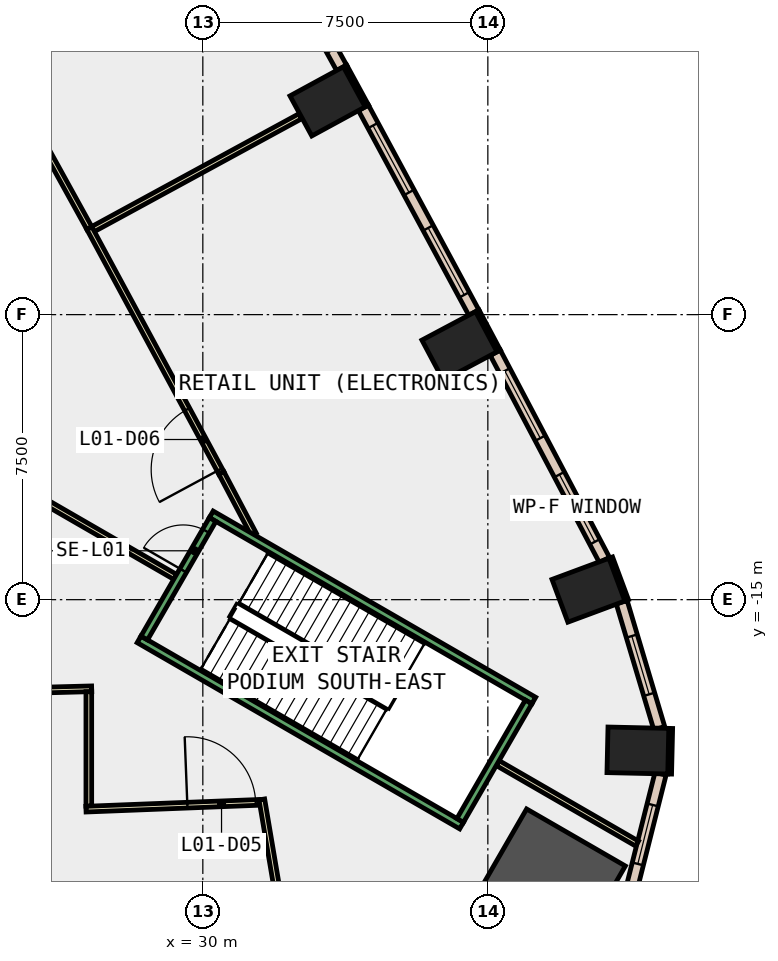
"""IFC4 building model, lengths in metres.
Left out: names, types, materials, properties, quantities, classifications, styles, units other than length and angle.
Written with IfcOpenShell. Run it as: python <this file> out.ifc"""

import sys

from ifc_helpers import new_model, si_unit, direction, frame, frame_2d, origin, origin_2d, place, context, subcontext, project, spatial, rectangle, extrude, element, fill, save


model = new_model("IFC4")
c1 = context("Model", 3, precision=1e-05, world=origin(), true_north=direction((0.0, 1.0)))
c2 = subcontext(c1, "Body", "Model", "MODEL_VIEW")
j1 = project(units=[si_unit("LENGTHUNIT", "METRE"), si_unit("PLANEANGLEUNIT", "RADIAN")], contexts=[c1])
p1 = place(None, origin())
s1 = spatial("IfcSite", under=j1, at=p1, CompositionType="ELEMENT")
p2 = place(p1, origin())
s2 = spatial("IfcBuilding", under=s1, at=p2, CompositionType="ELEMENT")
p3 = place(p2, frame((0.0, 0.0, 9.0)))
s3 = spatial("IfcBuildingStorey", under=s2, at=p3, CompositionType="ELEMENT", Elevation=9.0)
p4 = place(p3, frame((39.069, -22.556, -0.45), z_axis=(0.0, 0.0, 1.0), x_axis=(-0.866025403784, 0.5, 0.0)))
e1 = element("IfcColumn", 1, at=p4, inside=s3, PredefinedType="COLUMN", context=c2, shape_type="SweptSolid", body=[
    extrude(rectangle(XDim=3.0, YDim=3.0, at=origin_2d()), origin(), (0.0, 0.0, 1.0), 6.0),
])
for number, where, z_axis, x_axis in (
    (2, (41.448, -18.969, -0.45), (0.0, 0.0, 1.0), (0.023, 1.0, 0.0)),
    (3, (40.147, -14.751, -0.45), (0.0, 0.0, 1.0), (-0.348, 0.937, 0.0)),
    (4, (36.753, -8.325, -0.45), (0.0, 0.0, 1.0), (-0.469, 0.883, 0.0)),
    (5, (33.283, -1.889, -0.45), (0.0, 0.0, 1.0), (-0.478, 0.878, 0.0)),
):
    element("IfcColumn", number, at=place(p3, frame(where, z_axis=z_axis, x_axis=x_axis)), inside=s3, PredefinedType="COLUMN", context=c2, shape_type="SweptSolid", body=[
        extrude(rectangle(XDim=1.2, YDim=1.6, at=origin_2d()), origin(), (0.0, 0.0, 1.0), 6.0),
    ])
p5 = place(p3, frame((41.153, -15.018, 0.0), z_axis=(0.0, 0.0, 1.0), x_axis=(-0.348268249601, 0.937394914814, 0.0)))
e6 = element("IfcWall", 6, at=p5, inside=s3, PredefinedType="STANDARD", context=c2, shape_type="SweptSolid", body=[
    extrude(rectangle(XDim=1.2, YDim=0.1, at=frame_2d((0.6, 0.0))), origin(), (0.0, 0.0, 1.0), 5.55),
])
p6 = place(p3, frame((37.785, -8.456, 0.0), z_axis=(0.0, 0.0, 1.0), x_axis=(-0.469383408131, 0.882994459876, 0.0)))
e7 = element("IfcWall", 7, at=p6, inside=s3, PredefinedType="STANDARD", context=c2, shape_type="SweptSolid", body=[
    extrude(rectangle(XDim=1.199, YDim=0.1, at=frame_2d((0.6, 0.0))), origin(), (0.0, 0.0, 1.0), 5.55),
])
for number, where, z_axis, x_axis in (
    (8, (34.316, -2.01, 0.0), (0.0, 0.0, 1.0), (-0.478, 0.878, 0.0)),
    (9, (42.284, -19.588, 0.0), (0.0, 0.0, 1.0), (0.023, 1.0, 0.0)),
):
    element("IfcWall", number, at=place(p3, frame(where, z_axis=z_axis, x_axis=x_axis)), inside=s3, PredefinedType="STANDARD", context=c2, shape_type="SweptSolid", body=[
        extrude(rectangle(XDim=1.2, YDim=0.1, at=frame_2d((0.6, 0.0))), origin(), (0.0, 0.0, 1.0), 5.55),
    ])
p7 = place(p3, frame((41.24, -22.772, 0.0), z_axis=(0.0, 0.0, 1.0), x_axis=(0.244315836028, 0.969695711172, 0.0)))
e10 = element("IfcWall", 10, at=p7, inside=s3, PredefinedType="STANDARD", context=c2, shape_type="SweptSolid", body=[
    extrude(rectangle(XDim=3.291, YDim=0.3, at=frame_2d((1.645, 0.0))), origin(), (0.0, 0.0, 1.0), 5.55),
])
p8 = place(p7, frame((0.845, 0.0, 1.0)))
e11 = element("IfcOpeningElement", 11, at=p8, cuts=e10, PredefinedType="OPENING", context=c2, shape_type="SweptSolid", body=[
    extrude(rectangle(XDim=1.6, YDim=4.0, at=frame_2d((0.8, 2.0))), frame((0.0, 0.16, 0.0), z_axis=(0.0, -1.0, 0.0), x_axis=(1.0, 0.0, 0.0)), (0.0, 0.0, 1.0), 0.32),
])
p9 = place(p3, frame((42.011, -18.382, 0.0), z_axis=(0.0, 0.0, 1.0), x_axis=(-0.285800575124, 0.958289116738, 0.0)))
e12 = element("IfcWall", 12, at=p9, inside=s3, PredefinedType="STANDARD", context=c2, shape_type="SweptSolid", body=[
    extrude(rectangle(XDim=3.46, YDim=0.3, at=frame_2d((1.73, 0.0))), origin(), (0.0, 0.0, 1.0), 5.55),
])
p10 = place(p9, frame((0.93, 0.0, 1.0)))
e13 = element("IfcOpeningElement", 13, at=p10, cuts=e12, PredefinedType="OPENING", context=c2, shape_type="SweptSolid", body=[
    extrude(rectangle(XDim=1.6, YDim=4.0, at=frame_2d((0.8, 2.0))), frame((0.0, 0.16, 0.0), z_axis=(0.0, -1.0, 0.0), x_axis=(1.0, 0.0, 0.0)), (0.0, 0.0, 1.0), 0.32),
])
p11 = place(p3, frame((40.568, -13.956, 0.0), z_axis=(0.0, 0.0, 1.0), x_axis=(-0.466125129602, 0.884718804792, 0.0)))
e14 = element("IfcWall", 14, at=p11, inside=s3, PredefinedType="STANDARD", context=c2, shape_type="SweptSolid", body=[
    extrude(rectangle(XDim=6.164, YDim=0.3, at=frame_2d((3.082, 0.0))), origin(), (0.0, 0.0, 1.0), 5.55),
])
p12 = place(p11, frame((0.541, 0.0, 1.0)))
e15 = element("IfcOpeningElement", 15, at=p12, cuts=e14, PredefinedType="OPENING", context=c2, shape_type="SweptSolid", body=[
    extrude(rectangle(XDim=2.0, YDim=4.0, at=frame_2d((1.0, 2.0))), frame((0.0, 0.16, 0.0), z_axis=(0.0, -1.0, 0.0), x_axis=(1.0, 0.0, 0.0)), (0.0, 0.0, 1.0), 0.32),
])
p13 = place(p11, frame((3.623, 0.0, 1.0)))
e16 = element("IfcOpeningElement", 16, at=p13, cuts=e14, PredefinedType="OPENING", context=c2, shape_type="SweptSolid", body=[
    extrude(rectangle(XDim=2.0, YDim=4.0, at=frame_2d((1.0, 2.0))), frame((0.0, 0.16, 0.0), z_axis=(0.0, -1.0, 0.0), x_axis=(1.0, 0.0, 0.0)), (0.0, 0.0, 1.0), 0.32),
])
p14 = place(p3, frame((37.131, -7.446, 0.0), z_axis=(0.0, 0.0, 1.0), x_axis=(-0.474584950749, 0.880209704856, 0.0)))
e17 = element("IfcWall", 17, at=p14, inside=s3, PredefinedType="STANDARD", context=c2, shape_type="SweptSolid", body=[
    extrude(rectangle(XDim=6.121, YDim=0.3, at=frame_2d((3.061, 0.0))), origin(), (0.0, 0.0, 1.0), 5.55),
])
p15 = place(p14, frame((0.53, 0.0, 1.0)))
e18 = element("IfcOpeningElement", 18, at=p15, cuts=e17, PredefinedType="OPENING", context=c2, shape_type="SweptSolid", body=[
    extrude(rectangle(XDim=2.0, YDim=4.0, at=frame_2d((1.0, 2.0))), frame((0.0, 0.16, 0.0), z_axis=(0.0, -1.0, 0.0), x_axis=(1.0, 0.0, 0.0)), (0.0, 0.0, 1.0), 0.32),
])
p16 = place(p14, frame((3.591, 0.0, 1.0)))
e19 = element("IfcOpeningElement", 19, at=p16, cuts=e17, PredefinedType="OPENING", context=c2, shape_type="SweptSolid", body=[
    extrude(rectangle(XDim=2.0, YDim=4.0, at=frame_2d((1.0, 2.0))), frame((0.0, 0.16, 0.0), z_axis=(0.0, -1.0, 0.0), x_axis=(1.0, 0.0, 0.0)), (0.0, 0.0, 1.0), 0.32),
])
p17 = place(p3, frame((33.652, -1.006, 0.0), z_axis=(0.0, 0.0, 1.0), x_axis=(-0.483233380559, 0.875491576152, 0.0)))
e20 = element("IfcWall", 20, at=p17, inside=s3, PredefinedType="STANDARD", context=c2, shape_type="SweptSolid", body=[
    extrude(rectangle(XDim=6.121, YDim=0.3, at=frame_2d((3.061, 0.0))), origin(), (0.0, 0.0, 1.0), 5.55),
])
p18 = place(p17, frame((0.53, 0.0, 1.0)))
e21 = element("IfcOpeningElement", 21, at=p18, cuts=e20, PredefinedType="OPENING", context=c2, shape_type="SweptSolid", body=[
    extrude(rectangle(XDim=2.0, YDim=4.0, at=frame_2d((1.0, 2.0))), frame((0.0, 0.16, 0.0), z_axis=(0.0, -1.0, 0.0), x_axis=(1.0, 0.0, 0.0)), (0.0, 0.0, 1.0), 0.32),
])
p19 = place(p17, frame((3.591, 0.0, 1.0)))
e22 = element("IfcOpeningElement", 22, at=p19, cuts=e20, PredefinedType="OPENING", context=c2, shape_type="SweptSolid", body=[
    extrude(rectangle(XDim=2.0, YDim=4.0, at=frame_2d((1.0, 2.0))), frame((0.0, 0.16, 0.0), z_axis=(0.0, -1.0, 0.0), x_axis=(1.0, 0.0, 0.0)), (0.0, 0.0, 1.0), 0.32),
])
p20 = place(p3, frame((18.757, -17.565, 0.0), z_axis=(0.0, 0.0, 1.0), x_axis=(0.999650499667, 0.026436310543, 0.0)))
e23 = element("IfcWall", 23, at=p20, inside=s3, PredefinedType="PARTITIONING", context=c2, shape_type="SweptSolid", body=[
    extrude(rectangle(XDim=8.321, YDim=0.15, at=frame_2d((4.16, 0.0))), origin(), (0.0, 0.0, 1.0), 5.55),
])
p21 = place(p3, frame((27.0, -17.422, 0.0), z_axis=(0.0, 0.0, 1.0), x_axis=(0.0, -1.0, 0.0)))
e24 = element("IfcWall", 24, at=p21, inside=s3, PredefinedType="PARTITIONING", context=c2, shape_type="SweptSolid", body=[
    extrude(rectangle(XDim=3.012, YDim=0.15, at=frame_2d((1.506, 0.0))), origin(), (0.0, 0.0, 1.0), 5.55),
])
p22 = place(p3, frame((26.925, -20.512, 0.0), z_axis=(0.0, 0.0, 1.0), x_axis=(0.99923281192, 0.039163600211, 0.0)))
e25 = element("IfcWall", 25, at=p22, inside=s3, PredefinedType="PARTITIONING", context=c2, shape_type="SweptSolid", body=[
    extrude(rectangle(XDim=4.569, YDim=0.15, at=frame_2d((2.285, 0.0))), origin(), (0.0, 0.0, 1.0), 5.55),
])
p23 = place(p22, frame((2.67, 0.0, 0.0)))
e26 = element("IfcOpeningElement", 26, at=p23, cuts=e25, PredefinedType="OPENING", context=c2, shape_type="SweptSolid", body=[
    extrude(rectangle(XDim=1.8, YDim=2.1, at=frame_2d((0.9, 1.05))), frame((0.0, 0.085, 0.0), z_axis=(0.0, -1.0, 0.0), x_axis=(1.0, 0.0, 0.0)), (0.0, 0.0, 1.0), 0.17),
])
p24 = place(p3, frame((31.553, -20.256, 0.0), z_axis=(0.0, 0.0, 1.0), x_axis=(0.16693222012, -0.985968373674, 0.0)))
e27 = element("IfcWall", 27, at=p24, inside=s3, PredefinedType="PARTITIONING", context=c2, shape_type="SweptSolid", body=[
    extrude(rectangle(XDim=6.422, YDim=0.15, at=frame_2d((3.211, 0.0))), origin(), (0.0, 0.0, 1.0), 5.55),
])
p25 = place(p3, frame((27.047, -5.284, 0.0), z_axis=(0.0, 0.0, 1.0), x_axis=(0.878278583626, 0.478149275377, 0.0)))
e28 = element("IfcWall", 28, at=p25, inside=s3, PredefinedType="PARTITIONING", context=c2, shape_type="SweptSolid", body=[
    extrude(rectangle(XDim=6.28, YDim=0.15, at=frame_2d((3.14, 0.0))), origin(), (0.0, 0.0, 1.0), 5.55),
])
p26 = place(p3, frame((41.427, -21.418, 0.0), z_axis=(0.0, 0.0, 1.0), x_axis=(-0.866003200133, 0.500038455881, 0.0)))
e29 = element("IfcWall", 29, at=p26, inside=s3, PredefinedType="PARTITIONING", context=c2, shape_type="SweptSolid", body=[
    extrude(rectangle(XDim=4.236, YDim=0.15, at=frame_2d((2.118, 0.0))), origin(), (0.0, 0.0, 1.0), 5.55),
])
p27 = place(p3, frame((31.341, -13.285, 0.0), z_axis=(0.0, 0.0, 1.0), x_axis=(-0.466164290517, 0.884698171269, 0.0)))
e30 = element("IfcWall", 30, at=p27, inside=s3, PredefinedType="PARTITIONING", context=c2, shape_type="SweptSolid", body=[
    extrude(rectangle(XDim=1.83, YDim=0.15, at=frame_2d((0.915, 0.0))), origin(), (0.0, 0.0, 1.0), 5.55),
])
p28 = place(p3, frame((30.488, -11.666, 0.0), z_axis=(0.0, 0.0, 1.0), x_axis=(-0.474672609217, 0.880162436178, 0.0)))
e31 = element("IfcWall", 31, at=p28, inside=s3, PredefinedType="PARTITIONING", context=c2, shape_type="SweptSolid", body=[
    extrude(rectangle(XDim=7.319, YDim=0.15, at=frame_2d((3.66, 0.0))), origin(), (0.0, 0.0, 1.0), 5.55),
])
p29 = place(p28, frame((0.1, 0.0, 0.0)))
e32 = element("IfcOpeningElement", 32, at=p29, cuts=e31, PredefinedType="OPENING", context=c2, shape_type="SweptSolid", body=[
    extrude(rectangle(XDim=1.8, YDim=2.1, at=frame_2d((0.9, 1.05))), frame((0.0, 0.085, 0.0), z_axis=(0.0, -1.0, 0.0), x_axis=(1.0, 0.0, 0.0)), (0.0, 0.0, 1.0), 0.17),
])
p30 = place(p3, frame((27.014, -5.224, 0.0), z_axis=(0.0, 0.0, 1.0), x_axis=(-0.483261020847, 0.875476319343, 0.0)))
e33 = element("IfcWall", 33, at=p30, inside=s3, PredefinedType="PARTITIONING", context=c2, shape_type="SweptSolid", body=[
    extrude(rectangle(XDim=7.168, YDim=0.15, at=frame_2d((3.584, 0.0))), origin(), (0.0, 0.0, 1.0), 5.55),
])
p31 = place(p3, frame((10.392, -3.5, 0.0), z_axis=(0.0, 0.0, 1.0), x_axis=(0.866033409894, -0.499986132754, 0.0)))
e34 = element("IfcWall", 34, at=p31, inside=s3, PredefinedType="PARTITIONING", context=c2, shape_type="SweptSolid", body=[
    extrude(rectangle(XDim=21.8, YDim=0.15, at=frame_2d((10.9, 0.0))), origin(), (0.0, 0.0, 1.0), 5.55),
])
p32 = place(p31, frame((10.08, 0.0, 0.0)))
e35 = element("IfcOpeningElement", 35, at=p32, cuts=e34, PredefinedType="OPENING", context=c2, shape_type="SweptSolid", body=[
    extrude(rectangle(XDim=1.8, YDim=2.1, at=frame_2d((0.9, 1.05))), frame((0.0, 0.085, 0.0), z_axis=(0.0, -1.0, 0.0), x_axis=(1.0, 0.0, 0.0)), (0.0, 0.0, 1.0), 0.17),
])
for number, where, z_axis, x_axis in (
    (36, (28.322, -16.045, 0.0), (0.0, 0.0, 1.0), (0.866, -0.5, 0.0)),
    (37, (30.222, -12.755, 0.0), (0.0, 0.0, 1.0), (0.866, -0.5, 0.0)),
):
    element("IfcWall", number, at=place(p3, frame(where, z_axis=z_axis, x_axis=x_axis)), inside=s3, PredefinedType="STANDARD", context=c2, shape_type="SweptSolid", body=[
        extrude(rectangle(XDim=9.8, YDim=0.2, at=frame_2d((4.9, 0.0))), origin(), (0.0, 0.0, 1.0), 5.55),
    ])
p33 = place(p3, frame((28.458, -16.009, 0.0), z_axis=(0.0, 0.0, 1.0), x_axis=(0.499982693035, 0.866035395735, 0.0)))
e38 = element("IfcWall", 38, at=p33, inside=s3, PredefinedType="STANDARD", context=c2, shape_type="SweptSolid", body=[
    extrude(rectangle(XDim=3.6, YDim=0.2, at=frame_2d((1.8, 0.0))), origin(), (0.0, 0.0, 1.0), 5.55),
])
p34 = place(p33, frame((2.05, 0.0, 0.0)))
e39 = element("IfcOpeningElement", 39, at=p34, cuts=e38, PredefinedType="OPENING", context=c2, shape_type="SweptSolid", body=[
    extrude(rectangle(XDim=1.2, YDim=2.2, at=frame_2d((0.6, 1.1))), frame((0.0, 0.11, 0.0), z_axis=(0.0, -1.0, 0.0), x_axis=(1.0, 0.0, 0.0)), (0.0, 0.0, 1.0), 0.22),
])
p35 = place(p3, frame((36.772, -20.809, 0.0), z_axis=(0.0, 0.0, 1.0), x_axis=(0.49995333141, 0.866052346231, 0.0)))
e40 = element("IfcWall", 40, at=p35, inside=s3, PredefinedType="STANDARD", context=c2, shape_type="SweptSolid", body=[
    extrude(rectangle(XDim=3.6, YDim=0.2, at=frame_2d((1.8, 0.0))), origin(), (0.0, 0.0, 1.0), 5.55),
])
p36 = place(p8, origin())
e41 = element("IfcWindow", 41, at=p36, inside=s3, PartitioningType="SINGLE_PANEL", PredefinedType="WINDOW", context=c2, shape_type="SweptSolid", body=[
    extrude(rectangle(XDim=1.6, YDim=4.0, at=frame_2d((0.8, 2.0))), frame((0.0, 0.03, 0.0), z_axis=(0.0, -1.0, 0.0), x_axis=(1.0, 0.0, 0.0)), (0.0, 0.0, 1.0), 0.06),
])
fill(e11, e41)
p37 = place(p10, origin())
e42 = element("IfcWindow", 42, at=p37, inside=s3, PartitioningType="SINGLE_PANEL", PredefinedType="WINDOW", context=c2, shape_type="SweptSolid", body=[
    extrude(rectangle(XDim=1.6, YDim=4.0, at=frame_2d((0.8, 2.0))), frame((0.0, 0.03, 0.0), z_axis=(0.0, -1.0, 0.0), x_axis=(1.0, 0.0, 0.0)), (0.0, 0.0, 1.0), 0.06),
])
fill(e13, e42)
p38 = place(p12, origin())
e43 = element("IfcWindow", 43, at=p38, inside=s3, PartitioningType="SINGLE_PANEL", PredefinedType="WINDOW", context=c2, shape_type="SweptSolid", body=[
    extrude(rectangle(XDim=2.0, YDim=4.0, at=frame_2d((1.0, 2.0))), frame((0.0, 0.03, 0.0), z_axis=(0.0, -1.0, 0.0), x_axis=(1.0, 0.0, 0.0)), (0.0, 0.0, 1.0), 0.06),
])
fill(e15, e43)
p39 = place(p13, origin())
e44 = element("IfcWindow", 44, at=p39, inside=s3, PartitioningType="SINGLE_PANEL", PredefinedType="WINDOW", context=c2, shape_type="SweptSolid", body=[
    extrude(rectangle(XDim=2.0, YDim=4.0, at=frame_2d((1.0, 2.0))), frame((0.0, 0.03, 0.0), z_axis=(0.0, -1.0, 0.0), x_axis=(1.0, 0.0, 0.0)), (0.0, 0.0, 1.0), 0.06),
])
fill(e16, e44)
p40 = place(p15, origin())
e45 = element("IfcWindow", 45, at=p40, inside=s3, PartitioningType="SINGLE_PANEL", PredefinedType="WINDOW", context=c2, shape_type="SweptSolid", body=[
    extrude(rectangle(XDim=2.0, YDim=4.0, at=frame_2d((1.0, 2.0))), frame((0.0, 0.03, 0.0), z_axis=(0.0, -1.0, 0.0), x_axis=(1.0, 0.0, 0.0)), (0.0, 0.0, 1.0), 0.06),
])
fill(e18, e45)
p41 = place(p16, origin())
e46 = element("IfcWindow", 46, at=p41, inside=s3, PartitioningType="SINGLE_PANEL", PredefinedType="WINDOW", context=c2, shape_type="SweptSolid", body=[
    extrude(rectangle(XDim=2.0, YDim=4.0, at=frame_2d((1.0, 2.0))), frame((0.0, 0.03, 0.0), z_axis=(0.0, -1.0, 0.0), x_axis=(1.0, 0.0, 0.0)), (0.0, 0.0, 1.0), 0.06),
])
fill(e19, e46)
p42 = place(p23, origin())
e47 = element("IfcDoor", 47, at=p42, inside=s3, OperationType="DOUBLE_DOOR_SINGLE_SWING", PredefinedType="DOOR", context=c2, shape_type="SweptSolid", body=[
    extrude(rectangle(XDim=1.8, YDim=2.1, at=frame_2d((0.9, 1.05))), frame((0.0, 0.025, 0.0), z_axis=(0.0, -1.0, 0.0), x_axis=(1.0, 0.0, 0.0)), (0.0, 0.0, 1.0), 0.05),
])
fill(e26, e47)
p43 = place(p29, origin())
e48 = element("IfcDoor", 48, at=p43, inside=s3, OperationType="DOUBLE_DOOR_SINGLE_SWING", PredefinedType="DOOR", context=c2, shape_type="SweptSolid", body=[
    extrude(rectangle(XDim=1.8, YDim=2.1, at=frame_2d((0.9, 1.05))), frame((0.0, 0.025, 0.0), z_axis=(0.0, -1.0, 0.0), x_axis=(1.0, 0.0, 0.0)), (0.0, 0.0, 1.0), 0.05),
])
fill(e32, e48)
p44 = place(p34, origin())
e49 = element("IfcDoor", 49, at=p44, inside=s3, OperationType="SINGLE_SWING_LEFT", PredefinedType="DOOR", context=c2, shape_type="SweptSolid", body=[
    extrude(rectangle(XDim=1.2, YDim=2.2, at=frame_2d((0.6, 1.1))), frame((0.0, 0.025, 0.0), z_axis=(0.0, -1.0, 0.0), x_axis=(1.0, 0.0, 0.0)), (0.0, 0.0, 1.0), 0.05),
])
fill(e39, e49)
save(model, sys.argv[1])
